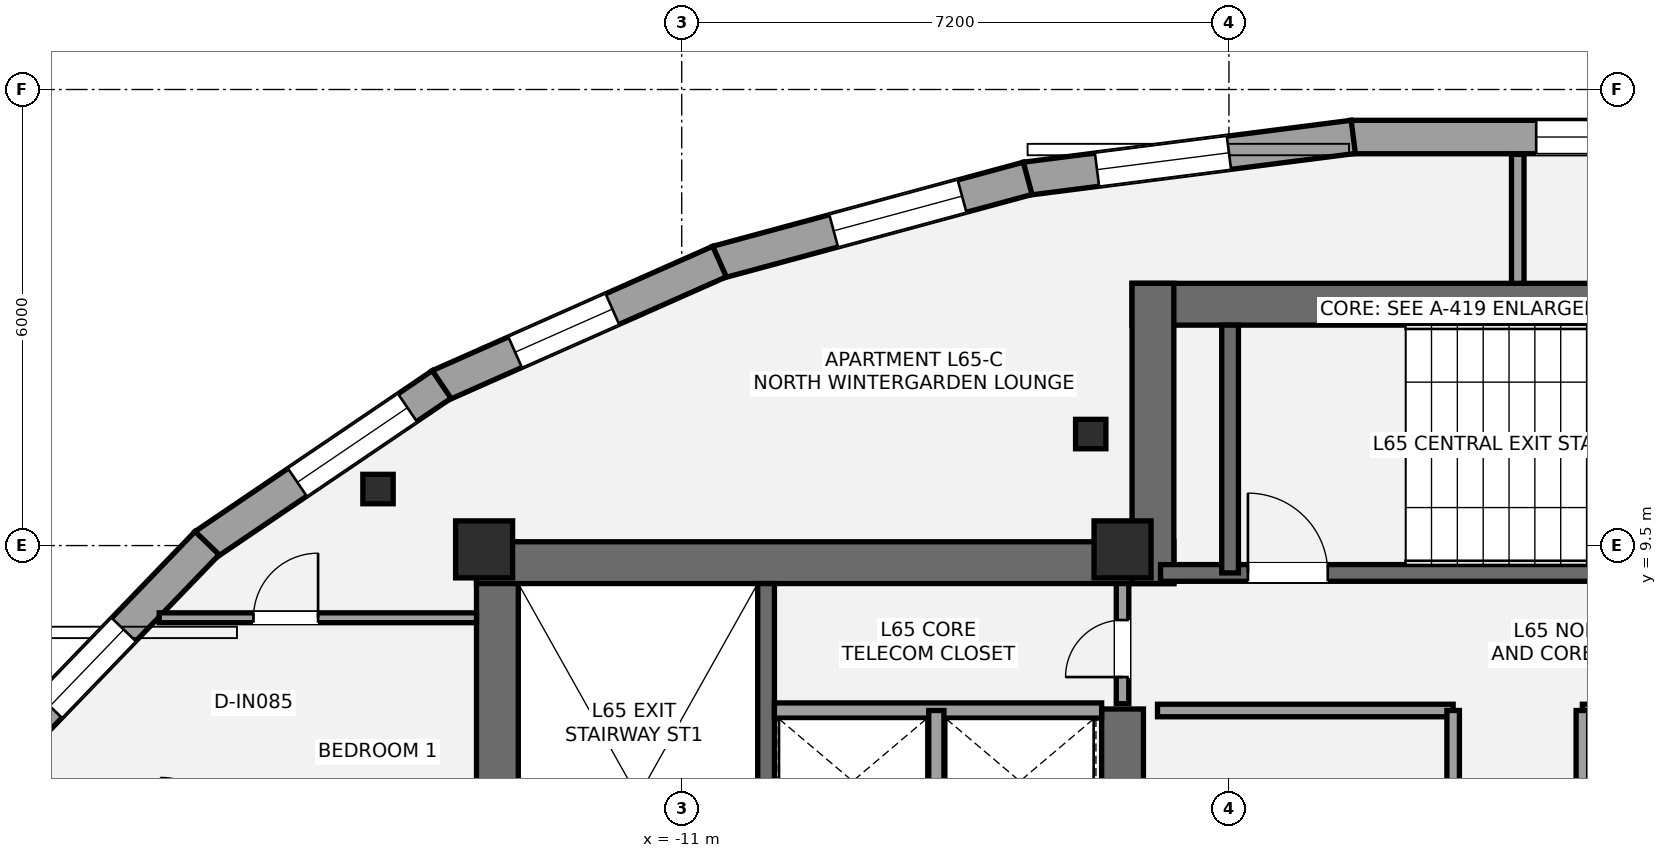
"""IFC4 building model, lengths in metres.
Left out: names, types, materials, properties, quantities, classifications, styles, units other than length and angle.
Written with IfcOpenShell. Run it as: python <this file> out.ifc"""

import sys

from ifc_helpers import new_model, si_unit, direction, frame, frame_2d, origin, origin_2d, place, context, subcontext, project, spatial, rectangle, i_section, extrude, element, fill, save


model = new_model("IFC4")
c1 = context("Model", 3, precision=1e-05, world=origin(), true_north=direction((0.0, 1.0)))
c2 = subcontext(c1, "Body", "Model", "MODEL_VIEW")
j1 = project(units=[si_unit("LENGTHUNIT", "METRE"), si_unit("PLANEANGLEUNIT", "RADIAN")], contexts=[c1])
p1 = place(None, origin())
s1 = spatial("IfcSite", under=j1, at=p1, CompositionType="ELEMENT")
p2 = place(p1, origin())
s2 = spatial("IfcBuilding", under=s1, at=p2, CompositionType="ELEMENT")
p3 = place(p2, frame((0.0, 0.0, 232.05)))
s3 = spatial("IfcBuildingStorey", under=s2, at=p3, CompositionType="ELEMENT", Elevation=232.05)
p4 = place(p3, frame((-13.425, 1.3, 0.0), z_axis=(0.0, 0.0, 1.0), x_axis=(0.0, 1.0, 0.0)))
e1 = element("IfcWall", 1, at=p4, inside=s3, PredefinedType="SHEAR", context=c2, shape_type="SweptSolid", body=[
    extrude(rectangle(XDim=8.25, YDim=0.55, at=frame_2d((4.125, 0.0))), origin(), (0.0, 0.0, 1.0), 3.15),
])
p5 = place(p3, frame((-13.7, 9.275, 0.0), z_axis=(0.0, 0.0, 1.0), x_axis=(1.0, 0.0, 0.0)))
e2 = element("IfcWall", 2, at=p5, inside=s3, PredefinedType="SHEAR", context=c2, shape_type="SweptSolid", body=[
    extrude(rectangle(XDim=9.175, YDim=0.55, at=frame_2d((4.587, 0.0))), origin(), (0.0, 0.0, 1.0), 3.15),
])
p6 = place(p3, frame((-5.2, 5.35, 0.0), z_axis=(0.0, 0.0, 1.0), x_axis=(0.0, 1.0, 0.0)))
e3 = element("IfcWall", 3, at=p6, inside=s3, PredefinedType="SHEAR", context=c2, shape_type="SweptSolid", body=[
    extrude(rectangle(XDim=2.0, YDim=0.55, at=frame_2d((1.0, 0.0))), origin(), (0.0, 0.0, 1.0), 3.15),
])
p7 = place(p3, frame((-9.89, 1.85, 0.0), z_axis=(0.0, 0.0, 1.0), x_axis=(0.0, 1.0, 0.0)))
e4 = element("IfcWall", 4, at=p7, inside=s3, PredefinedType="SHEAR", context=c2, shape_type="SweptSolid", body=[
    extrude(rectangle(XDim=7.15, YDim=0.22, at=frame_2d((3.575, 0.0))), origin(), (0.0, 0.0, 1.0), 3.15),
])
p8 = place(p3, frame((-5.075, 12.675, 0.0), z_axis=(0.0, 0.0, 1.0), x_axis=(1.0, 0.0, 0.0)))
e5 = element("IfcWall", 5, at=p8, inside=s3, PredefinedType="SHEAR", context=c2, shape_type="SweptSolid", body=[
    extrude(rectangle(XDim=10.15, YDim=0.55, at=frame_2d((5.075, 0.0))), origin(), (0.0, 0.0, 1.0), 3.15),
])
p9 = place(p3, frame((-4.8, 9.0, 0.0), z_axis=(0.0, 0.0, 1.0), x_axis=(0.0, 1.0, 0.0)))
e6 = element("IfcWall", 6, at=p9, inside=s3, PredefinedType="SHEAR", context=c2, shape_type="SweptSolid", body=[
    extrude(rectangle(XDim=3.95, YDim=0.55, at=frame_2d((1.975, 0.0))), origin(), (0.0, 0.0, 1.0), 3.15),
])
p10 = place(p3, frame((-4.7, 9.14, 0.0), z_axis=(0.0, 0.0, 1.0), x_axis=(1.0, 0.0, 0.0)))
e7 = element("IfcWall", 7, at=p10, inside=s3, PredefinedType="SHEAR", context=c2, shape_type="SweptSolid", body=[
    extrude(rectangle(XDim=9.3, YDim=0.22, at=frame_2d((4.65, 0.0))), origin(), (0.0, 0.0, 1.0), 3.15),
])
p11 = place(p10, frame((1.15, 0.0, 0.0)))
e8 = element("IfcOpeningElement", 8, at=p11, cuts=e7, PredefinedType="OPENING", context=c2, shape_type="SweptSolid", body=[
    extrude(rectangle(XDim=1.05, YDim=2.15, at=frame_2d((0.525, 1.075))), frame((0.0, 0.12, 0.0), z_axis=(0.0, -1.0, 0.0), x_axis=(1.0, 0.0, 0.0)), (0.0, 0.0, 1.0), 0.24),
])
p12 = place(p3, frame((-3.785, 9.14, 0.0), z_axis=(0.0, 0.0, 1.0), x_axis=(0.0, 1.0, 0.0)))
e9 = element("IfcWall", 9, at=p12, inside=s3, PredefinedType="SHEAR", context=c2, shape_type="SweptSolid", body=[
    extrude(rectangle(XDim=3.26, YDim=0.22, at=frame_2d((1.63, 0.0))), origin(), (0.0, 0.0, 1.0), 3.15),
])
for number, where, z_axis, x_axis in (
    (10, (-13.6, 9.45, 0.0), (0.0, 0.0, 1.0), (1.0, 0.0, 0.0)),
    (11, (-5.2, 9.45, 0.0), (0.0, 0.0, 1.0), (1.0, 0.0, 0.0)),
):
    element("IfcColumn", number, at=place(p3, frame(where, z_axis=z_axis, x_axis=x_axis)), inside=s3, PredefinedType="PILASTER", context=c2, shape_type="SweptSolid", body=[
        extrude(rectangle(XDim=0.75, YDim=0.75, at=origin_2d()), origin(), (0.0, 0.0, 1.0), 3.15),
    ])
for number, where, z_axis, x_axis in (
    (12, (-5.619, 10.967, 0.0), (0.0, 0.0, 1.0), (1.0, 0.0, 0.0)),
    (13, (-14.996, 10.244, 0.0), (0.0, 0.0, 1.0), (1.0, 0.0, 0.0)),
):
    element("IfcColumn", number, at=place(p3, frame(where, z_axis=z_axis, x_axis=x_axis)), inside=s3, PredefinedType="COLUMN", context=c2, shape_type="SweptSolid", body=[
        extrude(i_section(OverallWidth=0.399, OverallDepth=0.387, WebThickness=0.021, FlangeThickness=0.033, at=origin_2d()), origin(), (0.0, 0.0, 1.0), 3.15),
    ])
p13 = place(p3, frame((-2.192, 14.875, 0.0), z_axis=(0.0, 0.0, 1.0), x_axis=(1.0, 0.0, 0.0)))
e14 = element("IfcWall", 14, at=p13, inside=s3, PredefinedType="STANDARD", context=c2, shape_type="SweptSolid", body=[
    extrude(rectangle(XDim=4.385, YDim=0.44, at=frame_2d((2.192, 0.0))), origin(), (0.0, 0.0, 1.0), 2.336),
])
p14 = place(p13, frame((2.435, 0.0, 0.55)))
e15 = element("IfcOpeningElement", 15, at=p14, cuts=e14, PredefinedType="OPENING", context=c2, shape_type="SweptSolid", body=[
    extrude(rectangle(XDim=1.75, YDim=1.55, at=frame_2d((0.875, 0.775))), frame((0.0, 0.23, 0.0), z_axis=(0.0, -1.0, 0.0), x_axis=(1.0, 0.0, 0.0)), (0.0, 0.0, 1.0), 0.46),
])
p15 = place(p3, frame((-6.478, 14.325, 0.0), z_axis=(0.0, 0.0, 1.0), x_axis=(0.991932064275, 0.126770579643, 0.0)))
e16 = element("IfcWall", 16, at=p15, inside=s3, PredefinedType="STANDARD", context=c2, shape_type="SweptSolid", body=[
    extrude(rectangle(XDim=4.349, YDim=0.44, at=frame_2d((2.174, 0.0))), origin(), (0.0, 0.0, 1.0), 2.336),
])
p16 = place(p15, frame((0.949, 0.0, 0.55)))
e17 = element("IfcOpeningElement", 17, at=p16, cuts=e16, PredefinedType="OPENING", context=c2, shape_type="SweptSolid", body=[
    extrude(rectangle(XDim=1.75, YDim=1.55, at=frame_2d((0.875, 0.775))), frame((0.0, 0.23, 0.0), z_axis=(0.0, -1.0, 0.0), x_axis=(1.0, 0.0, 0.0)), (0.0, 0.0, 1.0), 0.46),
])
p17 = place(p3, frame((-10.534, 13.225, 0.0), z_axis=(0.0, 0.0, 1.0), x_axis=(0.965250622562, 0.261325918429, 0.0)))
e18 = element("IfcWall", 18, at=p17, inside=s3, PredefinedType="STANDARD", context=c2, shape_type="SweptSolid", body=[
    extrude(rectangle(XDim=4.233, YDim=0.44, at=frame_2d((2.117, 0.0))), origin(), (0.0, 0.0, 1.0), 2.336),
])
p18 = place(p17, frame((1.589, 0.0, 0.55)))
e19 = element("IfcOpeningElement", 19, at=p18, cuts=e18, PredefinedType="OPENING", context=c2, shape_type="SweptSolid", body=[
    extrude(rectangle(XDim=1.75, YDim=1.55, at=frame_2d((0.875, 0.775))), frame((0.0, 0.23, 0.0), z_axis=(0.0, -1.0, 0.0), x_axis=(1.0, 0.0, 0.0)), (0.0, 0.0, 1.0), 0.46),
])
p19 = place(p3, frame((-14.193, 11.6, 0.0), z_axis=(0.0, 0.0, 1.0), x_axis=(0.914197700285, 0.405268509501, 0.0)))
e20 = element("IfcWall", 20, at=p19, inside=s3, PredefinedType="STANDARD", context=c2, shape_type="SweptSolid", body=[
    extrude(rectangle(XDim=4.037, YDim=0.44, at=frame_2d((2.019, 0.0))), origin(), (0.0, 0.0, 1.0), 2.336),
])
p20 = place(p19, frame((1.095, 0.0, 0.55)))
e21 = element("IfcOpeningElement", 21, at=p20, cuts=e20, PredefinedType="OPENING", context=c2, shape_type="SweptSolid", body=[
    extrude(rectangle(XDim=1.4, YDim=1.55, at=frame_2d((0.7, 0.775))), frame((0.0, 0.23, 0.0), z_axis=(0.0, -1.0, 0.0), x_axis=(1.0, 0.0, 0.0)), (0.0, 0.0, 1.0), 0.46),
])
p21 = place(p3, frame((-17.279, 9.503, 0.0), z_axis=(0.0, 0.0, 1.0), x_axis=(0.827641205742, 0.56125754744, 0.0)))
e22 = element("IfcWall", 22, at=p21, inside=s3, PredefinedType="STANDARD", context=c2, shape_type="SweptSolid", body=[
    extrude(rectangle(XDim=3.771, YDim=0.44, at=frame_2d((1.885, 0.0))), origin(), (0.0, 0.0, 1.0), 2.336),
])
p22 = place(p21, frame((1.477, 0.0, 0.55)))
e23 = element("IfcOpeningElement", 23, at=p22, cuts=e22, PredefinedType="OPENING", context=c2, shape_type="SweptSolid", body=[
    extrude(rectangle(XDim=1.75, YDim=1.55, at=frame_2d((0.875, 0.775))), frame((0.0, 0.23, 0.0), z_axis=(0.0, -1.0, 0.0), x_axis=(1.0, 0.0, 0.0)), (0.0, 0.0, 1.0), 0.46),
])
p23 = place(p3, frame((-19.657, 7.03, 0.0), z_axis=(0.0, 0.0, 1.0), x_axis=(0.694030285144, 0.71994580581, 0.0)))
e24 = element("IfcWall", 24, at=p23, inside=s3, PredefinedType="STANDARD", context=c2, shape_type="SweptSolid", body=[
    extrude(rectangle(XDim=3.476, YDim=0.44, at=frame_2d((1.738, 0.0))), origin(), (0.0, 0.0, 1.0), 2.336),
])
p24 = place(p23, frame((0.496, 0.0, 0.58)))
e25 = element("IfcOpeningElement", 25, at=p24, cuts=e24, PredefinedType="OPENING", context=c2, shape_type="SweptSolid", body=[
    extrude(rectangle(XDim=1.4, YDim=1.55, at=frame_2d((0.7, 0.775))), frame((0.0, 0.23, 0.0), z_axis=(0.0, -1.0, 0.0), x_axis=(1.0, 0.0, 0.0)), (0.0, 0.0, 1.0), 0.46),
])
p25 = place(p3, frame((-9.78, 7.33, 0.0), z_axis=(0.0, 0.0, 1.0), x_axis=(1.0, 0.0, 0.0)))
e26 = element("IfcWall", 26, at=p25, inside=s3, PredefinedType="SOLIDWALL", context=c2, shape_type="SweptSolid", body=[
    extrude(rectangle(XDim=4.305, YDim=0.2, at=frame_2d((2.152, 0.0))), origin(), (0.0, 0.0, 1.0), 2.97),
])
p26 = place(p3, frame((-7.65, 5.47, 0.0), z_axis=(0.0, 0.0, 1.0), x_axis=(0.0, 1.0, 0.0)))
e27 = element("IfcWall", 27, at=p26, inside=s3, PredefinedType="SOLIDWALL", context=c2, shape_type="SweptSolid", body=[
    extrude(rectangle(XDim=1.86, YDim=0.2, at=frame_2d((0.93, 0.0))), origin(), (0.0, 0.0, 1.0), 2.97),
])
p27 = place(p3, frame((-4.74, 7.33, 0.0), z_axis=(0.0, 0.0, 1.0), x_axis=(1.0, 0.0, 0.0)))
e28 = element("IfcWall", 28, at=p27, inside=s3, PredefinedType="PARTITIONING", context=c2, shape_type="SweptSolid", body=[
    extrude(rectangle(XDim=3.89, YDim=0.165, at=frame_2d((1.945, 0.0))), origin(), (0.0, 0.0, 1.0), 2.97),
])
p28 = place(p3, frame((-0.85, 5.52, 0.0), z_axis=(0.0, 0.0, 1.0), x_axis=(0.0, 1.0, 0.0)))
e29 = element("IfcWall", 29, at=p28, inside=s3, PredefinedType="PARTITIONING", context=c2, shape_type="SweptSolid", body=[
    extrude(rectangle(XDim=1.81, YDim=0.165, at=frame_2d((0.905, 0.0))), origin(), (0.0, 0.0, 1.0), 2.97),
])
p29 = place(p3, frame((0.85, 7.33, 0.0), z_axis=(0.0, 0.0, 1.0), x_axis=(1.0, 0.0, 0.0)))
e30 = element("IfcWall", 30, at=p29, inside=s3, PredefinedType="PARTITIONING", context=c2, shape_type="SweptSolid", body=[
    extrude(rectangle(XDim=3.89, YDim=0.165, at=frame_2d((1.945, 0.0))), origin(), (0.0, 0.0, 1.0), 2.97),
])
p30 = place(p3, frame((0.85, 5.52, 0.0), z_axis=(0.0, 0.0, 1.0), x_axis=(0.0, 1.0, 0.0)))
e31 = element("IfcWall", 31, at=p30, inside=s3, PredefinedType="PARTITIONING", context=c2, shape_type="SweptSolid", body=[
    extrude(rectangle(XDim=1.81, YDim=0.165, at=frame_2d((0.905, 0.0))), origin(), (0.0, 0.0, 1.0), 2.97),
])
p31 = place(p3, frame((-5.2, 7.42, 0.0), z_axis=(0.0, 0.0, 1.0), x_axis=(0.0, 1.0, 0.0)))
e32 = element("IfcWall", 32, at=p31, inside=s3, PredefinedType="PARTITIONING", context=c2, shape_type="SweptSolid", body=[
    extrude(rectangle(XDim=1.58, YDim=0.165, at=frame_2d((0.79, 0.0))), origin(), (0.0, 0.0, 1.0), 2.97),
])
p32 = place(p31, frame((0.35, 0.0, 0.0)))
e33 = element("IfcOpeningElement", 33, at=p32, cuts=e32, PredefinedType="OPENING", context=c2, shape_type="SweptSolid", body=[
    extrude(rectangle(XDim=0.75, YDim=2.1, at=frame_2d((0.375, 1.05))), frame((0.0, 0.093, 0.0), z_axis=(0.0, -1.0, 0.0), x_axis=(1.0, 0.0, 0.0)), (0.0, 0.0, 1.0), 0.185),
])
p33 = place(p3, frame((0.0, 12.95, 0.0), z_axis=(0.0, 0.0, 1.0), x_axis=(0.0, 1.0, 0.0)))
e34 = element("IfcWall", 34, at=p33, inside=s3, PredefinedType="PARTITIONING", context=c2, shape_type="SweptSolid", body=[
    extrude(rectangle(XDim=1.697, YDim=0.165, at=frame_2d((0.848, 0.0))), origin(), (0.0, 0.0, 1.0), 2.97),
])
p34 = place(p3, frame((-17.875, 8.55, 0.0), z_axis=(0.0, 0.0, 1.0), x_axis=(1.0, 0.0, 0.0)))
e35 = element("IfcWall", 35, at=p34, inside=s3, PredefinedType="PARTITIONING", context=c2, shape_type="SweptSolid", body=[
    extrude(rectangle(XDim=4.175, YDim=0.13, at=frame_2d((2.087, 0.0))), origin(), (0.0, 0.0, 1.0), 2.423),
])
p35 = place(p34, frame((1.24, 0.0, 0.0)))
e36 = element("IfcOpeningElement", 36, at=p35, cuts=e35, PredefinedType="OPENING", context=c2, shape_type="SweptSolid", body=[
    extrude(rectangle(XDim=0.85, YDim=2.1, at=frame_2d((0.425, 1.05))), frame((0.0, 0.075, 0.0), z_axis=(0.0, -1.0, 0.0), x_axis=(1.0, 0.0, 0.0)), (0.0, 0.0, 1.0), 0.15),
])
p36 = place(p14, origin())
e37 = element("IfcWindow", 37, at=p36, inside=s3, PartitioningType="SINGLE_PANEL", PredefinedType="WINDOW", context=c2, shape_type="SweptSolid", body=[
    extrude(rectangle(XDim=1.75, YDim=1.55, at=frame_2d((0.875, 0.775))), frame((0.0, -0.01, 0.0), z_axis=(0.0, -1.0, 0.0), x_axis=(1.0, 0.0, 0.0)), (0.0, 0.0, 1.0), 0.06),
])
fill(e15, e37)
p37 = place(p16, origin())
e38 = element("IfcWindow", 38, at=p37, inside=s3, PartitioningType="SINGLE_PANEL", PredefinedType="WINDOW", context=c2, shape_type="SweptSolid", body=[
    extrude(rectangle(XDim=1.75, YDim=1.55, at=frame_2d((0.875, 0.775))), frame((0.0, -0.01, 0.0), z_axis=(0.0, -1.0, 0.0), x_axis=(1.0, 0.0, 0.0)), (0.0, 0.0, 1.0), 0.06),
])
fill(e17, e38)
p38 = place(p18, origin())
e39 = element("IfcWindow", 39, at=p38, inside=s3, PartitioningType="SINGLE_PANEL", PredefinedType="WINDOW", context=c2, shape_type="SweptSolid", body=[
    extrude(rectangle(XDim=1.75, YDim=1.55, at=frame_2d((0.875, 0.775))), frame((0.0, -0.01, 0.0), z_axis=(0.0, -1.0, 0.0), x_axis=(1.0, 0.0, 0.0)), (0.0, 0.0, 1.0), 0.06),
])
fill(e19, e39)
p39 = place(p20, origin())
e40 = element("IfcWindow", 40, at=p39, inside=s3, PartitioningType="SINGLE_PANEL", PredefinedType="WINDOW", context=c2, shape_type="SweptSolid", body=[
    extrude(rectangle(XDim=1.4, YDim=1.55, at=frame_2d((0.7, 0.775))), frame((0.0, -0.01, 0.0), z_axis=(0.0, -1.0, 0.0), x_axis=(1.0, 0.0, 0.0)), (0.0, 0.0, 1.0), 0.06),
])
fill(e21, e40)
p40 = place(p22, origin())
e41 = element("IfcWindow", 41, at=p40, inside=s3, PartitioningType="SINGLE_PANEL", PredefinedType="WINDOW", context=c2, shape_type="SweptSolid", body=[
    extrude(rectangle(XDim=1.75, YDim=1.55, at=frame_2d((0.875, 0.775))), frame((0.0, -0.01, 0.0), z_axis=(0.0, -1.0, 0.0), x_axis=(1.0, 0.0, 0.0)), (0.0, 0.0, 1.0), 0.06),
])
fill(e23, e41)
p41 = place(p24, origin())
e42 = element("IfcWindow", 42, at=p41, inside=s3, PartitioningType="SINGLE_PANEL", PredefinedType="WINDOW", context=c2, shape_type="SweptSolid", body=[
    extrude(rectangle(XDim=1.4, YDim=1.55, at=frame_2d((0.7, 0.775))), frame((0.0, -0.01, 0.0), z_axis=(0.0, -1.0, 0.0), x_axis=(1.0, 0.0, 0.0)), (0.0, 0.0, 1.0), 0.06),
])
fill(e25, e42)
p42 = place(p11, origin())
e43 = element("IfcDoor", 43, at=p42, inside=s3, OperationType="SINGLE_SWING_LEFT", PredefinedType="DOOR", context=c2, shape_type="SweptSolid", body=[
    extrude(rectangle(XDim=1.05, YDim=2.15, at=frame_2d((0.525, 1.075))), frame((0.0, 0.025, 0.0), z_axis=(0.0, -1.0, 0.0), x_axis=(1.0, 0.0, 0.0)), (0.0, 0.0, 1.0), 0.05),
])
fill(e8, e43)
p43 = place(p32, origin())
e44 = element("IfcDoor", 44, at=p43, inside=s3, OperationType="SINGLE_SWING_LEFT", PredefinedType="DOOR", context=c2, shape_type="SweptSolid", body=[
    extrude(rectangle(XDim=0.75, YDim=2.1, at=frame_2d((0.375, 1.05))), frame((0.0, 0.025, 0.0), z_axis=(0.0, -1.0, 0.0), x_axis=(1.0, 0.0, 0.0)), (0.0, 0.0, 1.0), 0.05),
])
fill(e33, e44)
p44 = place(p35, origin())
e45 = element("IfcDoor", 45, at=p44, inside=s3, OperationType="SINGLE_SWING_RIGHT", PredefinedType="DOOR", context=c2, shape_type="SweptSolid", body=[
    extrude(rectangle(XDim=0.85, YDim=2.1, at=frame_2d((0.425, 1.05))), frame((0.0, 0.025, 0.0), z_axis=(0.0, -1.0, 0.0), x_axis=(1.0, 0.0, 0.0)), (0.0, 0.0, 1.0), 0.05),
])
fill(e36, e45)
save(model, sys.argv[1])
